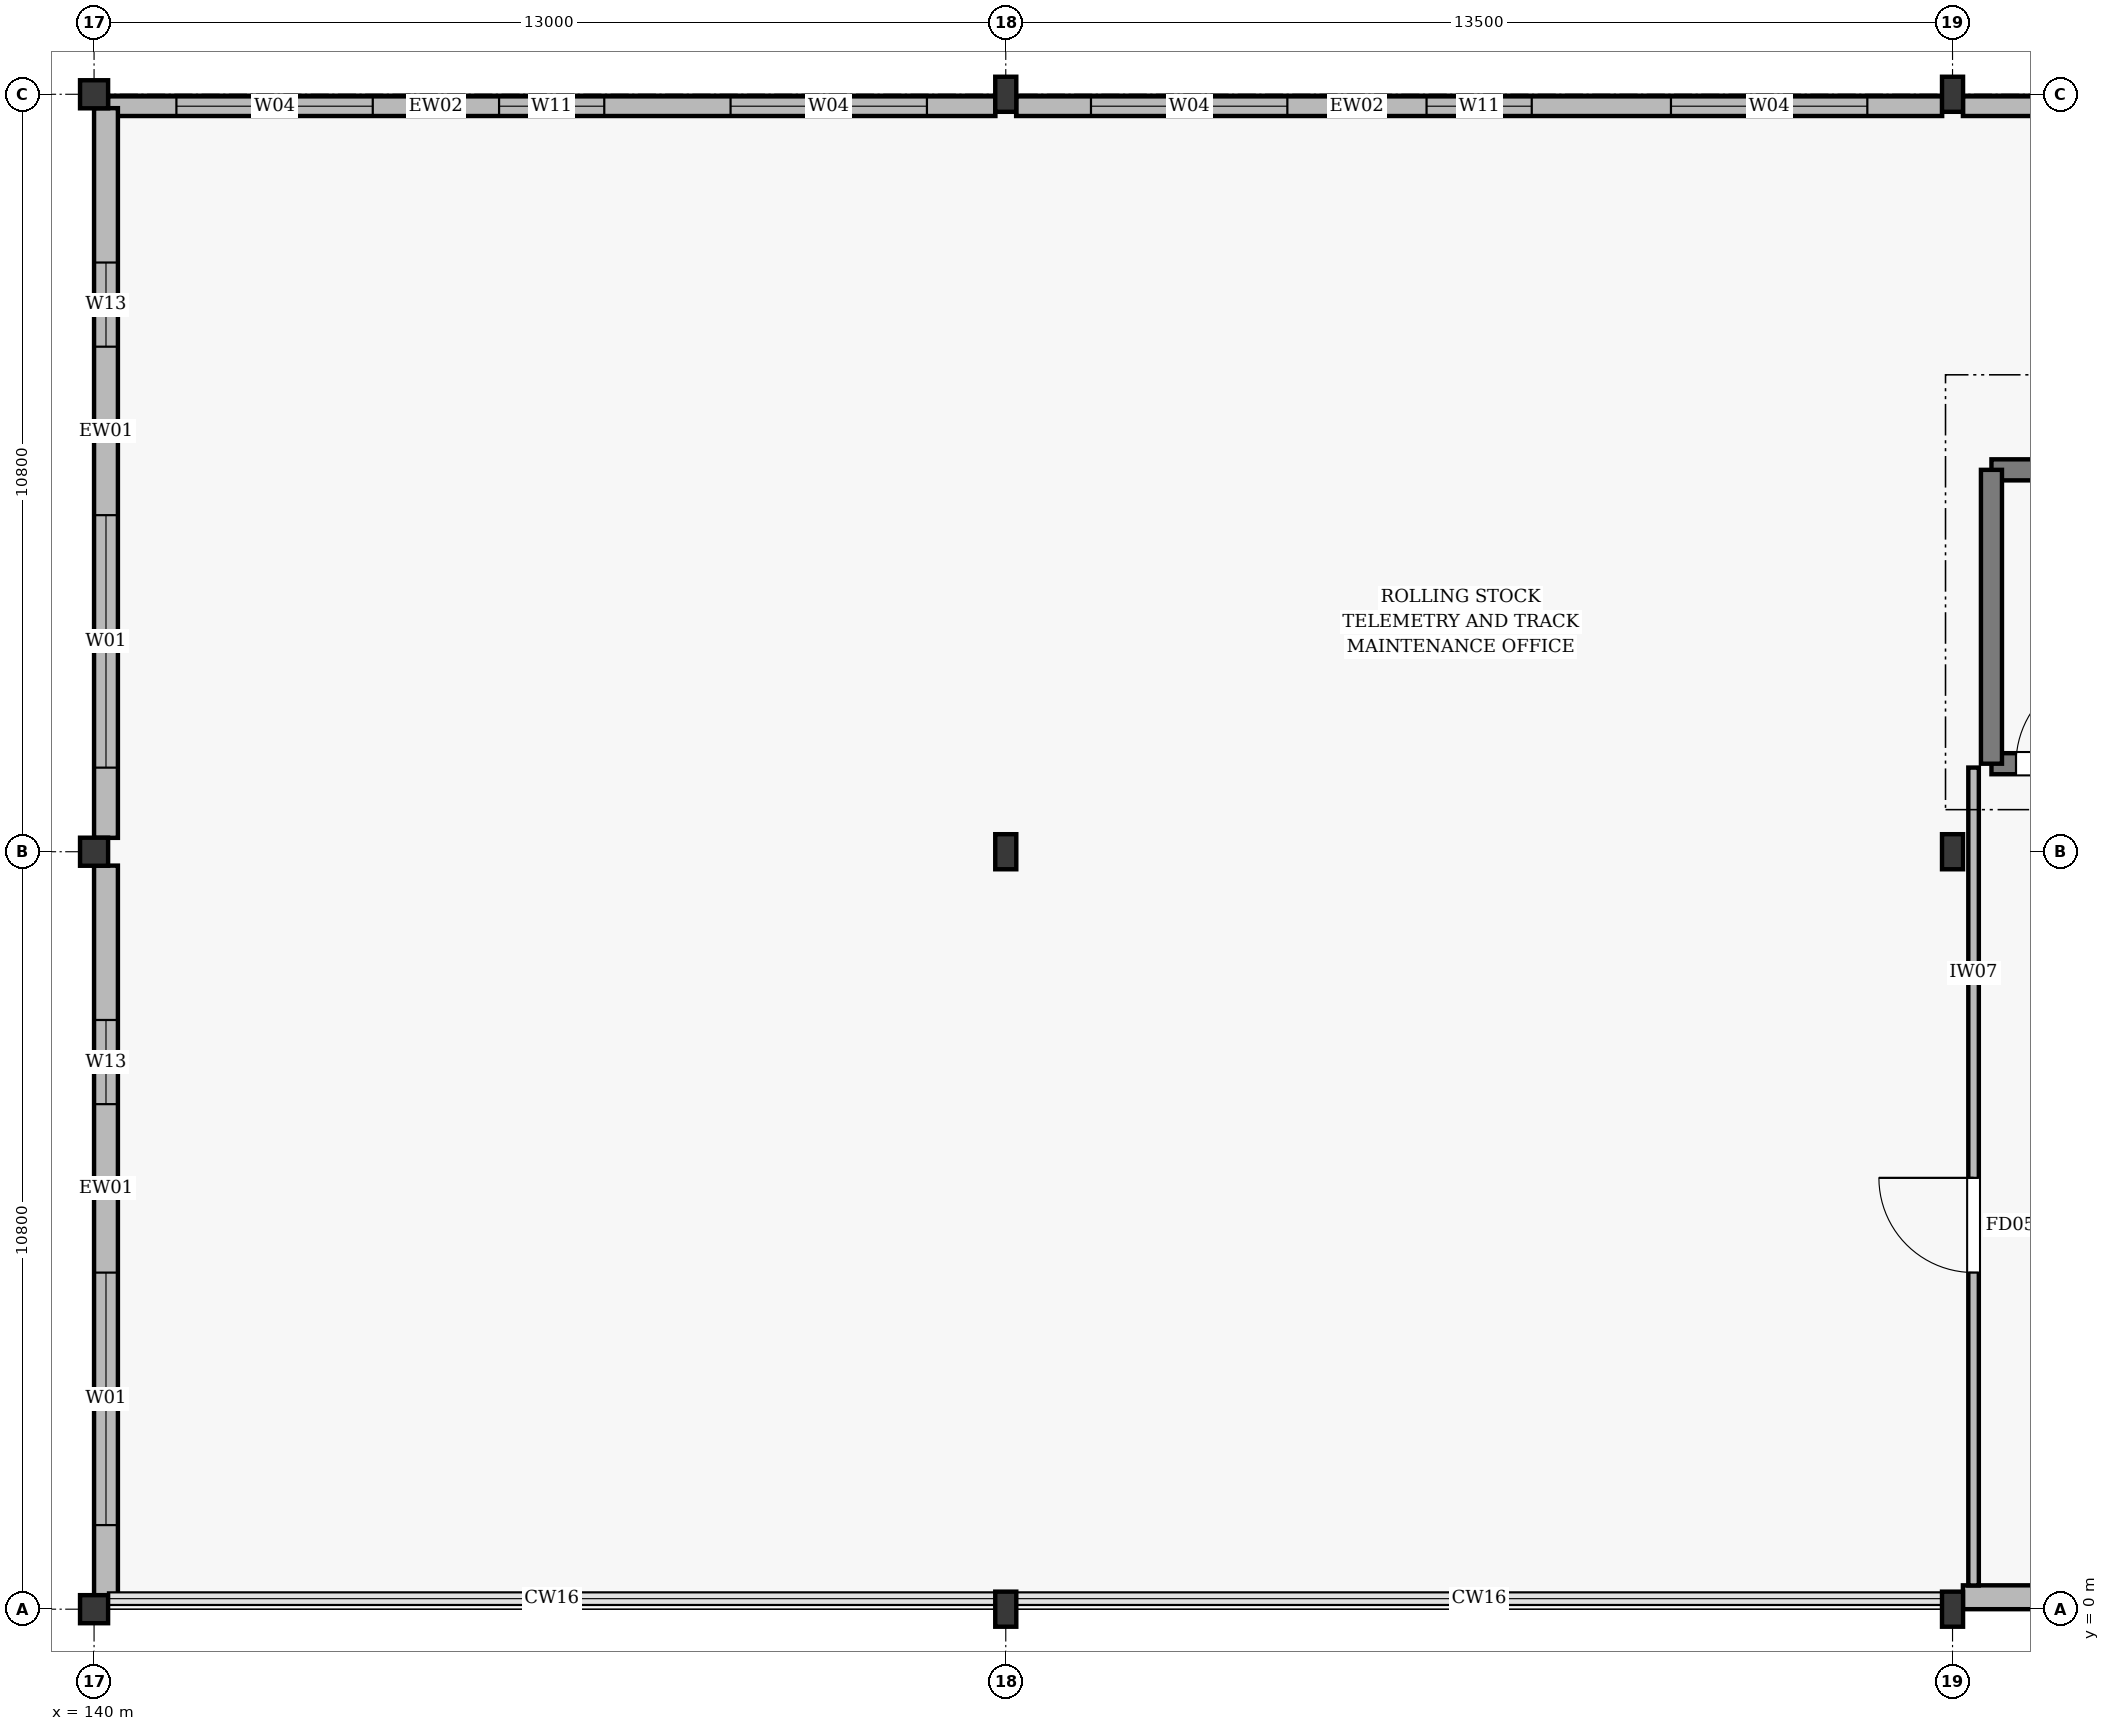
"""IFC4 building model, lengths in metres.
Left out: names, types, materials, properties, quantities, classifications, styles, units other than length and angle.
Written with IfcOpenShell. Run it as: python <this file> out.ifc"""

import sys

from ifc_helpers import new_model, si_unit, direction, frame, frame_2d, origin, origin_2d, place, context, subcontext, project, spatial, rectangle, hollow_rectangle, i_section, extrude, element, fill, save


model = new_model("IFC4")
c1 = context("Model", 3, precision=1e-05, world=origin(), true_north=direction((0.0, 1.0)))
c2 = subcontext(c1, "Body", "Model", "MODEL_VIEW")
j1 = project(units=[si_unit("LENGTHUNIT", "METRE"), si_unit("PLANEANGLEUNIT", "RADIAN")], contexts=[c1])
p1 = place(None, origin())
s1 = spatial("IfcSite", under=j1, at=p1, CompositionType="ELEMENT")
p2 = place(p1, origin())
s2 = spatial("IfcBuilding", under=s1, at=p2, CompositionType="ELEMENT")
p3 = place(p2, frame((0.0, 0.0, 6.6)))
s3 = spatial("IfcBuildingStorey", under=s2, at=p3, CompositionType="ELEMENT", Elevation=6.6)
for number, where, z_axis, x_axis in (
    (1, (140.0, 0.0, 0.0), (0.0, 0.0, 1.0), (1.0, 0.0, 0.0)),
    (2, (140.0, 10.8, 0.0), (0.0, 0.0, 1.0), (1.0, 0.0, 0.0)),
    (3, (140.0, 21.6, 0.0), (0.0, 0.0, 1.0), (1.0, 0.0, 0.0)),
):
    element("IfcColumn", number, at=place(p3, frame(where, z_axis=z_axis, x_axis=x_axis)), inside=s3, PredefinedType="COLUMN", context=c2, shape_type="SweptSolid", body=[
        extrude(hollow_rectangle(XDim=0.4, YDim=0.4, WallThickness=0.016, at=origin_2d()), origin(), (0.0, 0.0, 1.0), 6.0),
    ])
for number, where, z_axis, x_axis in (
    (4, (153.0, 0.0, 0.0), (0.0, 0.0, 1.0), (1.0, 0.0, 0.0)),
    (5, (153.0, 10.8, 0.0), (0.0, 0.0, 1.0), (1.0, 0.0, 0.0)),
    (6, (153.0, 21.6, 0.0), (0.0, 0.0, 1.0), (1.0, 0.0, 0.0)),
    (7, (166.5, 0.0, 0.0), (0.0, 0.0, 1.0), (1.0, 0.0, 0.0)),
    (8, (166.5, 10.8, 0.0), (0.0, 0.0, 1.0), (1.0, 0.0, 0.0)),
    (9, (166.5, 21.6, 0.0), (0.0, 0.0, 1.0), (1.0, 0.0, 0.0)),
):
    element("IfcColumn", number, at=place(p3, frame(where, z_axis=z_axis, x_axis=x_axis)), inside=s3, PredefinedType="COLUMN", context=c2, shape_type="SweptSolid", body=[
        extrude(i_section(OverallWidth=0.3, OverallDepth=0.5, WebThickness=0.014, FlangeThickness=0.028, at=origin_2d()), origin(), (0.0, 0.0, 1.0), 6.0),
    ])
p4 = place(p3, frame((166.648, 0.17, 0.0), z_axis=(0.0, 0.0, 1.0), x_axis=(1.0, 0.0, 0.0)))
e10 = element("IfcWall", 10, at=p4, inside=s3, PredefinedType="STANDARD", context=c2, shape_type="SweptSolid", body=[
    extrude(rectangle(XDim=13.204, YDim=0.34, at=frame_2d((6.602, 0.0))), origin(), (0.0, 0.0, 1.0), 5.15),
])
p5 = place(p4, frame((1.067, 0.0, 0.75)))
e11 = element("IfcOpeningElement", 11, at=p5, cuts=e10, PredefinedType="OPENING", context=c2, shape_type="SweptSolid", body=[
    extrude(rectangle(XDim=2.8, YDim=2.6, at=frame_2d((1.4, 1.3))), frame((0.0, 0.182, 0.0), z_axis=(0.0, -1.0, 0.0), x_axis=(1.0, 0.0, 0.0)), (0.0, 0.0, 1.0), 0.364),
])
p6 = place(p4, frame((4.802, 0.0, 1.05)))
e12 = element("IfcOpeningElement", 12, at=p6, cuts=e10, PredefinedType="OPENING", context=c2, shape_type="SweptSolid", body=[
    extrude(rectangle(XDim=3.6, YDim=1.4, at=frame_2d((1.8, 0.7))), frame((0.0, 0.182, 0.0), z_axis=(0.0, -1.0, 0.0), x_axis=(1.0, 0.0, 0.0)), (0.0, 0.0, 1.0), 0.364),
])
p7 = place(p4, frame((9.337, 0.0, 0.75)))
e13 = element("IfcOpeningElement", 13, at=p7, cuts=e10, PredefinedType="OPENING", context=c2, shape_type="SweptSolid", body=[
    extrude(rectangle(XDim=2.8, YDim=2.6, at=frame_2d((1.4, 1.3))), frame((0.0, 0.182, 0.0), z_axis=(0.0, -1.0, 0.0), x_axis=(1.0, 0.0, 0.0)), (0.0, 0.0, 1.0), 0.364),
])
p8 = place(p3, frame((140.198, 21.43, 0.0), z_axis=(0.0, 0.0, 1.0), x_axis=(1.0, 0.0, 0.0)))
e14 = element("IfcWall", 14, at=p8, inside=s3, PredefinedType="STANDARD", context=c2, shape_type="SweptSolid", body=[
    extrude(rectangle(XDim=12.654, YDim=0.28, at=frame_2d((6.327, 0.0))), origin(), (0.0, 0.0, 1.0), 5.09),
])
p9 = place(p8, frame((0.976, 0.0, 0.75)))
e15 = element("IfcOpeningElement", 15, at=p9, cuts=e14, PredefinedType="OPENING", context=c2, shape_type="SweptSolid", body=[
    extrude(rectangle(XDim=2.8, YDim=2.6, at=frame_2d((1.4, 1.3))), frame((0.0, 0.152, 0.0), z_axis=(0.0, -1.0, 0.0), x_axis=(1.0, 0.0, 0.0)), (0.0, 0.0, 1.0), 0.304),
])
p10 = place(p8, frame((5.577, 0.0, 0.75)))
e16 = element("IfcOpeningElement", 16, at=p10, cuts=e14, PredefinedType="OPENING", context=c2, shape_type="SweptSolid", body=[
    extrude(rectangle(XDim=1.5, YDim=2.0, at=frame_2d((0.75, 1.0))), frame((0.0, 0.152, 0.0), z_axis=(0.0, -1.0, 0.0), x_axis=(1.0, 0.0, 0.0)), (0.0, 0.0, 1.0), 0.304),
])
p11 = place(p8, frame((8.878, 0.0, 0.75)))
e17 = element("IfcOpeningElement", 17, at=p11, cuts=e14, PredefinedType="OPENING", context=c2, shape_type="SweptSolid", body=[
    extrude(rectangle(XDim=2.8, YDim=2.6, at=frame_2d((1.4, 1.3))), frame((0.0, 0.152, 0.0), z_axis=(0.0, -1.0, 0.0), x_axis=(1.0, 0.0, 0.0)), (0.0, 0.0, 1.0), 0.304),
])
p12 = place(p3, frame((153.148, 21.43, 0.0), z_axis=(0.0, 0.0, 1.0), x_axis=(1.0, 0.0, 0.0)))
e18 = element("IfcWall", 18, at=p12, inside=s3, PredefinedType="STANDARD", context=c2, shape_type="SweptSolid", body=[
    extrude(rectangle(XDim=13.204, YDim=0.28, at=frame_2d((6.602, 0.0))), origin(), (0.0, 0.0, 1.0), 5.09),
])
p13 = place(p12, frame((1.067, 0.0, 0.75)))
e19 = element("IfcOpeningElement", 19, at=p13, cuts=e18, PredefinedType="OPENING", context=c2, shape_type="SweptSolid", body=[
    extrude(rectangle(XDim=2.8, YDim=2.6, at=frame_2d((1.4, 1.3))), frame((0.0, 0.152, 0.0), z_axis=(0.0, -1.0, 0.0), x_axis=(1.0, 0.0, 0.0)), (0.0, 0.0, 1.0), 0.304),
])
p14 = place(p12, frame((5.852, 0.0, 0.75)))
e20 = element("IfcOpeningElement", 20, at=p14, cuts=e18, PredefinedType="OPENING", context=c2, shape_type="SweptSolid", body=[
    extrude(rectangle(XDim=1.5, YDim=2.0, at=frame_2d((0.75, 1.0))), frame((0.0, 0.152, 0.0), z_axis=(0.0, -1.0, 0.0), x_axis=(1.0, 0.0, 0.0)), (0.0, 0.0, 1.0), 0.304),
])
p15 = place(p12, frame((9.337, 0.0, 0.75)))
e21 = element("IfcOpeningElement", 21, at=p15, cuts=e18, PredefinedType="OPENING", context=c2, shape_type="SweptSolid", body=[
    extrude(rectangle(XDim=2.8, YDim=2.6, at=frame_2d((1.4, 1.3))), frame((0.0, 0.152, 0.0), z_axis=(0.0, -1.0, 0.0), x_axis=(1.0, 0.0, 0.0)), (0.0, 0.0, 1.0), 0.304),
])
p16 = place(p3, frame((166.648, 21.43, 0.0), z_axis=(0.0, 0.0, 1.0), x_axis=(1.0, 0.0, 0.0)))
e22 = element("IfcWall", 22, at=p16, inside=s3, PredefinedType="STANDARD", context=c2, shape_type="SweptSolid", body=[
    extrude(rectangle(XDim=13.204, YDim=0.28, at=frame_2d((6.602, 0.0))), origin(), (0.0, 0.0, 1.0), 5.09),
])
p17 = place(p16, frame((1.067, 0.0, 0.75)))
e23 = element("IfcOpeningElement", 23, at=p17, cuts=e22, PredefinedType="OPENING", context=c2, shape_type="SweptSolid", body=[
    extrude(rectangle(XDim=2.8, YDim=2.6, at=frame_2d((1.4, 1.3))), frame((0.0, 0.152, 0.0), z_axis=(0.0, -1.0, 0.0), x_axis=(1.0, 0.0, 0.0)), (0.0, 0.0, 1.0), 0.304),
])
p18 = place(p16, frame((5.852, 0.0, 0.75)))
e24 = element("IfcOpeningElement", 24, at=p18, cuts=e22, PredefinedType="OPENING", context=c2, shape_type="SweptSolid", body=[
    extrude(rectangle(XDim=1.5, YDim=2.0, at=frame_2d((0.75, 1.0))), frame((0.0, 0.152, 0.0), z_axis=(0.0, -1.0, 0.0), x_axis=(1.0, 0.0, 0.0)), (0.0, 0.0, 1.0), 0.304),
])
p19 = place(p16, frame((9.337, 0.0, 0.75)))
e25 = element("IfcOpeningElement", 25, at=p19, cuts=e22, PredefinedType="OPENING", context=c2, shape_type="SweptSolid", body=[
    extrude(rectangle(XDim=2.8, YDim=2.6, at=frame_2d((1.4, 1.3))), frame((0.0, 0.152, 0.0), z_axis=(0.0, -1.0, 0.0), x_axis=(1.0, 0.0, 0.0)), (0.0, 0.0, 1.0), 0.304),
])
p20 = place(p3, frame((140.17, 0.198, 0.0), z_axis=(0.0, 0.0, 1.0), x_axis=(0.0, 1.0, 0.0)))
e26 = element("IfcWall", 26, at=p20, inside=s3, PredefinedType="STANDARD", context=c2, shape_type="SweptSolid", body=[
    extrude(rectangle(XDim=10.404, YDim=0.34, at=frame_2d((5.202, 0.0))), origin(), (0.0, 0.0, 1.0), 5.15),
])
p21 = place(p20, frame((1.001, 0.0, 0.75)))
e27 = element("IfcOpeningElement", 27, at=p21, cuts=e26, PredefinedType="OPENING", context=c2, shape_type="SweptSolid", body=[
    extrude(rectangle(XDim=3.6, YDim=2.8, at=frame_2d((1.8, 1.4))), frame((0.0, 0.182, 0.0), z_axis=(0.0, -1.0, 0.0), x_axis=(1.0, 0.0, 0.0)), (0.0, 0.0, 1.0), 0.364),
])
p22 = place(p20, frame((7.003, 0.0, 1.05)))
e28 = element("IfcOpeningElement", 28, at=p22, cuts=e26, PredefinedType="OPENING", context=c2, shape_type="SweptSolid", body=[
    extrude(rectangle(XDim=1.2, YDim=1.8, at=frame_2d((0.6, 0.9))), frame((0.0, 0.182, 0.0), z_axis=(0.0, -1.0, 0.0), x_axis=(1.0, 0.0, 0.0)), (0.0, 0.0, 1.0), 0.364),
])
p23 = place(p3, frame((140.17, 10.998, 0.0), z_axis=(0.0, 0.0, 1.0), x_axis=(0.0, 1.0, 0.0)))
e29 = element("IfcWall", 29, at=p23, inside=s3, PredefinedType="STANDARD", context=c2, shape_type="SweptSolid", body=[
    extrude(rectangle(XDim=10.404, YDim=0.34, at=frame_2d((5.202, 0.0))), origin(), (0.0, 0.0, 1.0), 5.09),
])
p24 = place(p23, frame((1.001, 0.0, 0.75)))
e30 = element("IfcOpeningElement", 30, at=p24, cuts=e29, PredefinedType="OPENING", context=c2, shape_type="SweptSolid", body=[
    extrude(rectangle(XDim=3.6, YDim=2.8, at=frame_2d((1.8, 1.4))), frame((0.0, 0.182, 0.0), z_axis=(0.0, -1.0, 0.0), x_axis=(1.0, 0.0, 0.0)), (0.0, 0.0, 1.0), 0.364),
])
p25 = place(p23, frame((7.003, 0.0, 1.05)))
e31 = element("IfcOpeningElement", 31, at=p25, cuts=e29, PredefinedType="OPENING", context=c2, shape_type="SweptSolid", body=[
    extrude(rectangle(XDim=1.2, YDim=1.8, at=frame_2d((0.6, 0.9))), frame((0.0, 0.182, 0.0), z_axis=(0.0, -1.0, 0.0), x_axis=(1.0, 0.0, 0.0)), (0.0, 0.0, 1.0), 0.364),
])
p26 = place(p3, frame((167.055, 12.055, 0.0), z_axis=(0.0, 0.0, 1.0), x_axis=(1.0, 0.0, 0.0)))
e32 = element("IfcWall", 32, at=p26, inside=s3, PredefinedType="SOLIDWALL", context=c2, shape_type="SweptSolid", body=[
    extrude(rectangle(XDim=10.04, YDim=0.3, at=frame_2d((5.02, 0.0))), origin(), (0.0, 0.0, 1.0), 6.0),
])
p27 = place(p26, frame((0.35, 0.0, 0.005)))
e33 = element("IfcOpeningElement", 33, at=p27, cuts=e32, PredefinedType="OPENING", context=c2, shape_type="SweptSolid", body=[
    extrude(rectangle(XDim=1.35, YDim=2.15, at=frame_2d((0.675, 1.075))), frame((0.0, 0.162, 0.0), z_axis=(0.0, -1.0, 0.0), x_axis=(1.0, 0.0, 0.0)), (0.0, 0.0, 1.0), 0.324),
])
p28 = place(p3, frame((167.055, 16.245, 0.0), z_axis=(0.0, 0.0, 1.0), x_axis=(1.0, 0.0, 0.0)))
e34 = element("IfcWall", 34, at=p28, inside=s3, PredefinedType="SOLIDWALL", context=c2, shape_type="SweptSolid", body=[
    extrude(rectangle(XDim=10.04, YDim=0.3, at=frame_2d((5.02, 0.0))), origin(), (0.0, 0.0, 1.0), 6.0),
])
p29 = place(p3, frame((167.055, 12.055, 0.0), z_axis=(0.0, 0.0, 1.0), x_axis=(0.0, 1.0, 0.0)))
e35 = element("IfcWall", 35, at=p29, inside=s3, PredefinedType="SOLIDWALL", context=c2, shape_type="SweptSolid", body=[
    extrude(rectangle(XDim=4.19, YDim=0.3, at=frame_2d((2.095, 0.0))), origin(), (0.0, 0.0, 1.0), 6.0),
])
p30 = place(p3, frame((166.8, 0.338, 0.0), z_axis=(0.0, 0.0, 1.0), x_axis=(0.0, 1.0, 0.0)))
e36 = element("IfcWall", 36, at=p30, inside=s3, PredefinedType="PARTITIONING", context=c2, shape_type="SweptSolid", body=[
    extrude(rectangle(XDim=11.662, YDim=0.15, at=frame_2d((5.831, 0.0))), origin(), (0.0, 0.0, 1.0), 5.14),
])
p31 = place(p30, frame((4.462, 0.0, 0.005)))
e37 = element("IfcOpeningElement", 37, at=p31, cuts=e36, PredefinedType="OPENING", context=c2, shape_type="SweptSolid", body=[
    extrude(rectangle(XDim=1.35, YDim=2.15, at=frame_2d((0.675, 1.075))), frame((0.0, 0.087, 0.0), z_axis=(0.0, -1.0, 0.0), x_axis=(1.0, 0.0, 0.0)), (0.0, 0.0, 1.0), 0.174),
])
p32 = place(p9, origin())
e38 = element("IfcWindow", 38, at=p32, inside=s3, PartitioningType="DOUBLE_PANEL_VERTICAL", PredefinedType="WINDOW", context=c2, shape_type="SweptSolid", body=[
    extrude(rectangle(XDim=2.8, YDim=2.6, at=frame_2d((1.4, 1.3))), frame((0.0, 0.03, 0.0), z_axis=(0.0, -1.0, 0.0), x_axis=(1.0, 0.0, 0.0)), (0.0, 0.0, 1.0), 0.06),
])
fill(e15, e38)
p33 = place(p10, origin())
e39 = element("IfcWindow", 39, at=p33, inside=s3, PartitioningType="DOUBLE_PANEL_VERTICAL", PredefinedType="WINDOW", context=c2, shape_type="SweptSolid", body=[
    extrude(rectangle(XDim=1.5, YDim=2.0, at=frame_2d((0.75, 1.0))), frame((0.0, 0.03, 0.0), z_axis=(0.0, -1.0, 0.0), x_axis=(1.0, 0.0, 0.0)), (0.0, 0.0, 1.0), 0.06),
])
fill(e16, e39)
p34 = place(p11, origin())
e40 = element("IfcWindow", 40, at=p34, inside=s3, PartitioningType="DOUBLE_PANEL_VERTICAL", PredefinedType="WINDOW", context=c2, shape_type="SweptSolid", body=[
    extrude(rectangle(XDim=2.8, YDim=2.6, at=frame_2d((1.4, 1.3))), frame((0.0, 0.03, 0.0), z_axis=(0.0, -1.0, 0.0), x_axis=(1.0, 0.0, 0.0)), (0.0, 0.0, 1.0), 0.06),
])
fill(e17, e40)
p35 = place(p13, origin())
e41 = element("IfcWindow", 41, at=p35, inside=s3, PartitioningType="DOUBLE_PANEL_VERTICAL", PredefinedType="WINDOW", context=c2, shape_type="SweptSolid", body=[
    extrude(rectangle(XDim=2.8, YDim=2.6, at=frame_2d((1.4, 1.3))), frame((0.0, 0.03, 0.0), z_axis=(0.0, -1.0, 0.0), x_axis=(1.0, 0.0, 0.0)), (0.0, 0.0, 1.0), 0.06),
])
fill(e19, e41)
p36 = place(p14, origin())
e42 = element("IfcWindow", 42, at=p36, inside=s3, PartitioningType="DOUBLE_PANEL_VERTICAL", PredefinedType="WINDOW", context=c2, shape_type="SweptSolid", body=[
    extrude(rectangle(XDim=1.5, YDim=2.0, at=frame_2d((0.75, 1.0))), frame((0.0, 0.03, 0.0), z_axis=(0.0, -1.0, 0.0), x_axis=(1.0, 0.0, 0.0)), (0.0, 0.0, 1.0), 0.06),
])
fill(e20, e42)
p37 = place(p15, origin())
e43 = element("IfcWindow", 43, at=p37, inside=s3, PartitioningType="DOUBLE_PANEL_VERTICAL", PredefinedType="WINDOW", context=c2, shape_type="SweptSolid", body=[
    extrude(rectangle(XDim=2.8, YDim=2.6, at=frame_2d((1.4, 1.3))), frame((0.0, 0.03, 0.0), z_axis=(0.0, -1.0, 0.0), x_axis=(1.0, 0.0, 0.0)), (0.0, 0.0, 1.0), 0.06),
])
fill(e21, e43)
p38 = place(p21, origin())
e44 = element("IfcWindow", 44, at=p38, inside=s3, PartitioningType="DOUBLE_PANEL_VERTICAL", PredefinedType="WINDOW", context=c2, shape_type="SweptSolid", body=[
    extrude(rectangle(XDim=3.6, YDim=2.8, at=frame_2d((1.8, 1.4))), frame((0.0, 0.03, 0.0), z_axis=(0.0, -1.0, 0.0), x_axis=(1.0, 0.0, 0.0)), (0.0, 0.0, 1.0), 0.06),
])
fill(e27, e44)
p39 = place(p22, origin())
e45 = element("IfcWindow", 45, at=p39, inside=s3, PartitioningType="DOUBLE_PANEL_VERTICAL", PredefinedType="WINDOW", context=c2, shape_type="SweptSolid", body=[
    extrude(rectangle(XDim=1.2, YDim=1.8, at=frame_2d((0.6, 0.9))), frame((0.0, 0.03, 0.0), z_axis=(0.0, -1.0, 0.0), x_axis=(1.0, 0.0, 0.0)), (0.0, 0.0, 1.0), 0.06),
])
fill(e28, e45)
p40 = place(p24, origin())
e46 = element("IfcWindow", 46, at=p40, inside=s3, PartitioningType="DOUBLE_PANEL_VERTICAL", PredefinedType="WINDOW", context=c2, shape_type="SweptSolid", body=[
    extrude(rectangle(XDim=3.6, YDim=2.8, at=frame_2d((1.8, 1.4))), frame((0.0, 0.03, 0.0), z_axis=(0.0, -1.0, 0.0), x_axis=(1.0, 0.0, 0.0)), (0.0, 0.0, 1.0), 0.06),
])
fill(e30, e46)
p41 = place(p25, origin())
e47 = element("IfcWindow", 47, at=p41, inside=s3, PartitioningType="DOUBLE_PANEL_VERTICAL", PredefinedType="WINDOW", context=c2, shape_type="SweptSolid", body=[
    extrude(rectangle(XDim=1.2, YDim=1.8, at=frame_2d((0.6, 0.9))), frame((0.0, 0.03, 0.0), z_axis=(0.0, -1.0, 0.0), x_axis=(1.0, 0.0, 0.0)), (0.0, 0.0, 1.0), 0.06),
])
fill(e31, e47)
p42 = place(p27, origin())
e48 = element("IfcDoor", 48, at=p42, inside=s3, OperationType="SINGLE_SWING_RIGHT", PredefinedType="DOOR", context=c2, shape_type="SweptSolid", body=[
    extrude(rectangle(XDim=1.35, YDim=2.15, at=frame_2d((0.675, 1.075))), frame((0.0, 0.025, 0.0), z_axis=(0.0, -1.0, 0.0), x_axis=(1.0, 0.0, 0.0)), (0.0, 0.0, 1.0), 0.05),
])
fill(e33, e48)
p43 = place(p31, origin())
e49 = element("IfcDoor", 49, at=p43, inside=s3, OperationType="SINGLE_SWING_RIGHT", PredefinedType="DOOR", context=c2, shape_type="SweptSolid", body=[
    extrude(rectangle(XDim=1.35, YDim=2.15, at=frame_2d((0.675, 1.075))), frame((0.0, 0.025, 0.0), z_axis=(0.0, -1.0, 0.0), x_axis=(1.0, 0.0, 0.0)), (0.0, 0.0, 1.0), 0.05),
])
fill(e37, e49)
save(model, sys.argv[1])
